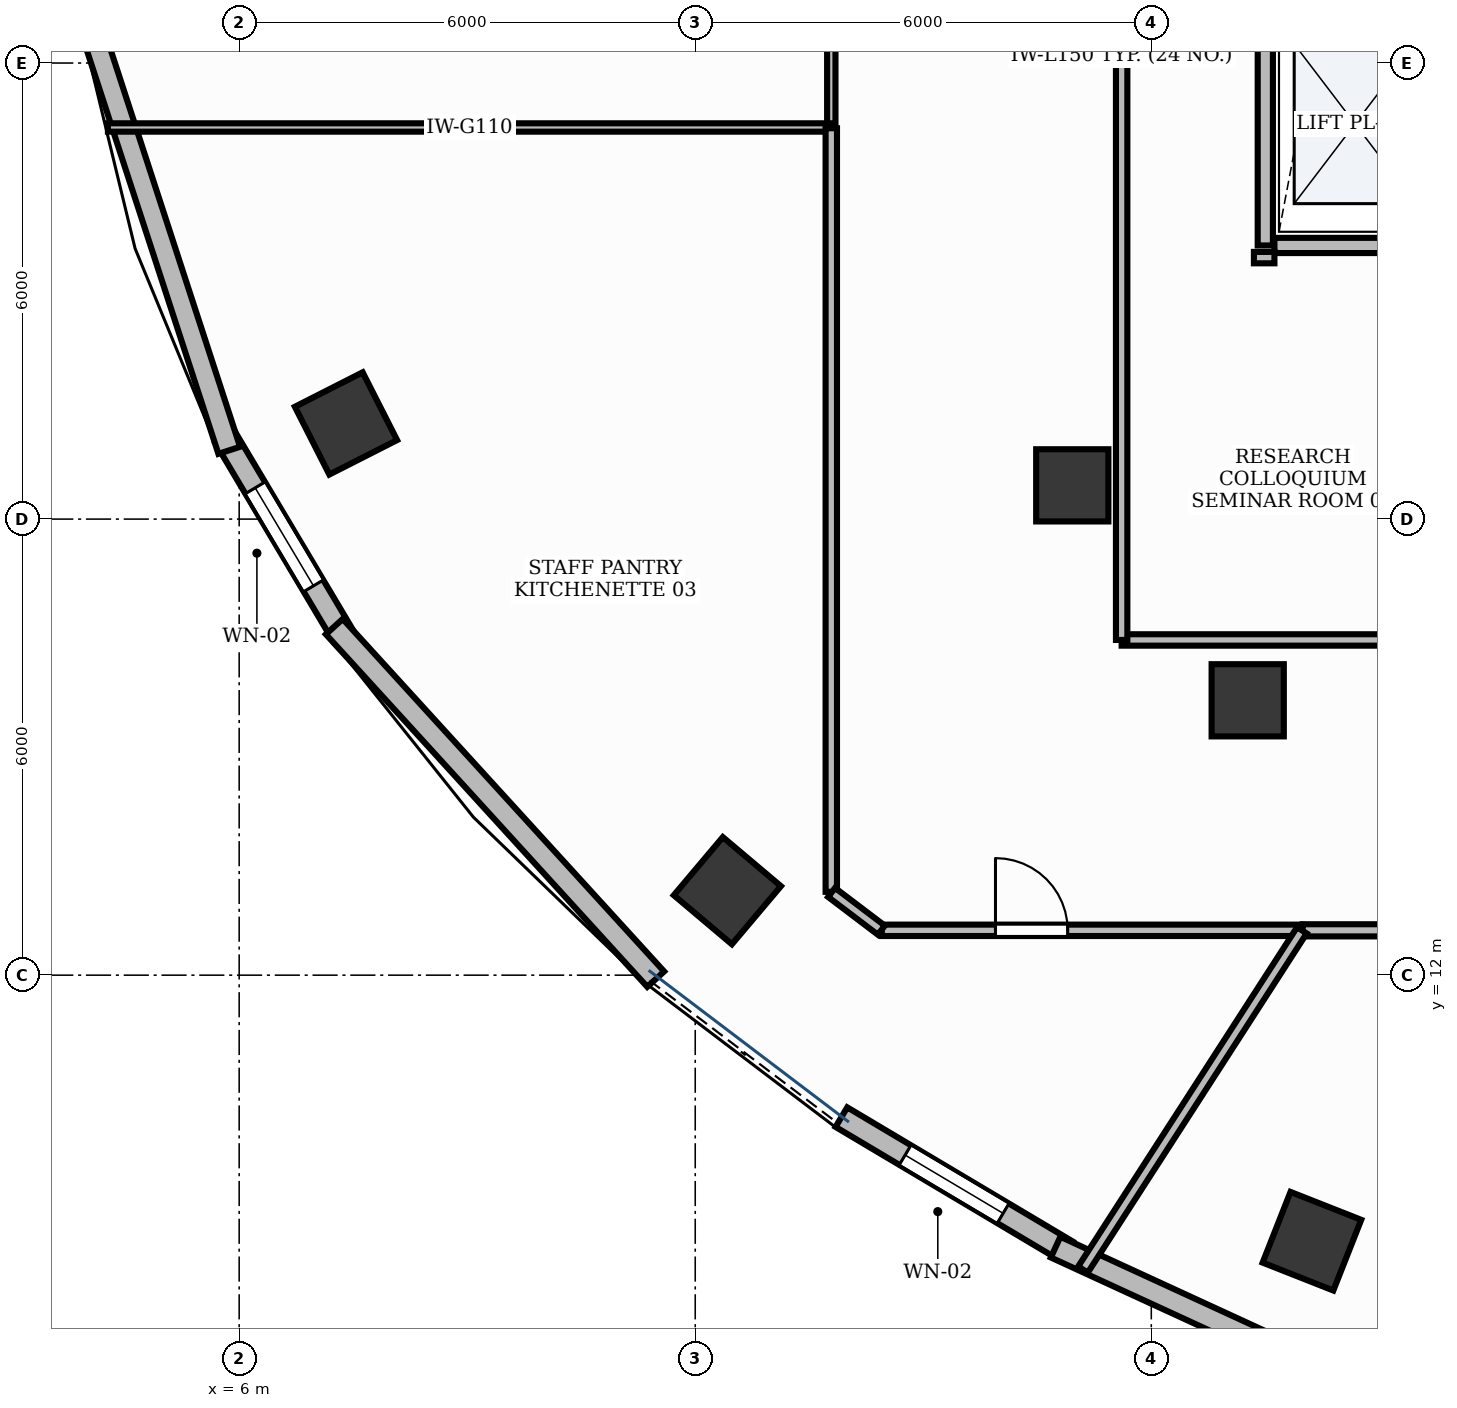
"""IFC4 building model, lengths in metres.
Left out: names, types, materials, properties, quantities, classifications, styles, units other than length and angle.
Written with IfcOpenShell. Run it as: python <this file> out.ifc"""

import sys

from ifc_helpers import new_model, si_unit, direction, frame, frame_2d, origin, origin_2d, place, context, subcontext, project, spatial, rectangle, extrude, element, fill, save


model = new_model("IFC4")
c1 = context("Model", 3, precision=1e-05, world=origin(), true_north=direction((0.0, 1.0)))
c2 = subcontext(c1, "Body", "Model", "MODEL_VIEW")
j1 = project(units=[si_unit("LENGTHUNIT", "METRE"), si_unit("PLANEANGLEUNIT", "RADIAN")], contexts=[c1])
p1 = place(None, origin())
s1 = spatial("IfcSite", under=j1, at=p1, CompositionType="ELEMENT")
p2 = place(p1, origin())
s2 = spatial("IfcBuilding", under=s1, at=p2, CompositionType="ELEMENT")
p3 = place(p2, frame((0.0, 0.0, 218.4)))
s3 = spatial("IfcBuildingStorey", under=s2, at=p3, CompositionType="ELEMENT", Elevation=218.4)
p4 = place(p3, frame((7.405, 19.259, -0.0), z_axis=(0.0, 0.0, 1.0), x_axis=(-0.453057191132, 0.891481453292, 0.0)))
e1 = element("IfcColumn", 1, at=p4, inside=s3, PredefinedType="COLUMN", context=c2, shape_type="SweptSolid", body=[
    extrude(rectangle(XDim=1.0, YDim=1.0, at=origin_2d()), origin(), (0.0, 0.0, 1.0), 3.901),
])
p5 = place(p3, frame((16.96, 18.444, -0.0), z_axis=(0.0, 0.0, 1.0), x_axis=(1.0, 0.0, 0.0)))
e2 = element("IfcColumn", 2, at=p5, inside=s3, PredefinedType="COLUMN", context=c2, shape_type="SweptSolid", body=[
    extrude(rectangle(XDim=0.95, YDim=0.95, at=origin_2d()), origin(), (0.0, 0.0, 1.0), 3.901),
])
p6 = place(p3, frame((12.423, 13.111, -0.0), z_axis=(0.0, 0.0, 1.0), x_axis=(-0.764246456939, 0.644924300253, 0.0)))
e3 = element("IfcColumn", 3, at=p6, inside=s3, PredefinedType="COLUMN", context=c2, shape_type="SweptSolid", body=[
    extrude(rectangle(XDim=1.0, YDim=1.0, at=origin_2d()), origin(), (0.0, 0.0, 1.0), 3.901),
])
p7 = place(p3, frame((19.268, 15.616, -0.0), z_axis=(0.0, 0.0, 1.0), x_axis=(1.0, 0.0, 0.0)))
e4 = element("IfcColumn", 4, at=p7, inside=s3, PredefinedType="COLUMN", context=c2, shape_type="SweptSolid", body=[
    extrude(rectangle(XDim=0.95, YDim=0.95, at=origin_2d()), origin(), (0.0, 0.0, 1.0), 3.901),
])
p8 = place(p3, frame((20.113, 8.5, -0.0), z_axis=(0.0, 0.0, 1.0), x_axis=(-0.930225540858, 0.366988341962, 0.0)))
e5 = element("IfcColumn", 5, at=p8, inside=s3, PredefinedType="COLUMN", context=c2, shape_type="SweptSolid", body=[
    extrude(rectangle(XDim=1.0, YDim=1.0, at=origin_2d()), origin(), (0.0, 0.0, 1.0), 3.901),
])
p9 = place(p3, frame((5.818, 19.071, 0.0), z_axis=(0.0, 0.0, 1.0), x_axis=(0.511263271049, -0.859424148879, 0.0)))
e6 = element("IfcWall", 6, at=p9, inside=s3, PredefinedType="STANDARD", context=c2, shape_type="SweptSolid", body=[
    extrude(rectangle(XDim=3.036, YDim=0.3, at=frame_2d((1.518, 0.0))), origin(), (0.0, 0.0, 1.0), 3.9),
])
p10 = place(p9, frame((0.768, 0.0, 0.95)))
e7 = element("IfcOpeningElement", 7, at=p10, cuts=e6, PredefinedType="OPENING", context=c2, shape_type="SweptSolid", body=[
    extrude(rectangle(XDim=1.5, YDim=1.8, at=frame_2d((0.75, 0.9))), frame((0.0, 0.165, 0.0), z_axis=(0.0, -1.0, 0.0), x_axis=(1.0, 0.0, 0.0)), (0.0, 0.0, 1.0), 0.33),
])
p11 = place(p3, frame((13.923, 10.132, 0.0), z_axis=(0.0, 0.0, 1.0), x_axis=(0.859459434124, -0.511203952543, 0.0)))
e8 = element("IfcWall", 8, at=p11, inside=s3, PredefinedType="STANDARD", context=c2, shape_type="SweptSolid", body=[
    extrude(rectangle(XDim=3.45, YDim=0.3, at=frame_2d((1.725, 0.0))), origin(), (0.0, 0.0, 1.0), 3.9),
])
p12 = place(p11, frame((0.975, 0.0, 0.95)))
e9 = element("IfcOpeningElement", 9, at=p12, cuts=e8, PredefinedType="OPENING", context=c2, shape_type="SweptSolid", body=[
    extrude(rectangle(XDim=1.5, YDim=1.8, at=frame_2d((0.75, 0.9))), frame((0.0, 0.165, 0.0), z_axis=(0.0, -1.0, 0.0), x_axis=(1.0, 0.0, 0.0)), (0.0, 0.0, 1.0), 0.33),
])
p13 = place(p3, frame((4.084, 24.379, 0.0), z_axis=(0.0, 0.0, 1.0), x_axis=(0.309937285623, -0.95075700312, 0.0)))
e10 = element("IfcWall", 10, at=p13, inside=s3, PredefinedType="STANDARD", context=c2, shape_type="SweptSolid", body=[
    extrude(rectangle(XDim=5.758, YDim=0.3, at=frame_2d((2.879, 0.0))), origin(), (0.0, 0.0, 1.0), 3.9),
])
p14 = place(p3, frame((7.252, 16.585, 0.0), z_axis=(0.0, 0.0, 1.0), x_axis=(0.673735114185, -0.73897293314, 0.0)))
e11 = element("IfcWall", 11, at=p14, inside=s3, PredefinedType="STANDARD", context=c2, shape_type="SweptSolid", body=[
    extrude(rectangle(XDim=6.276, YDim=0.3, at=frame_2d((3.138, 0.0))), origin(), (0.0, 0.0, 1.0), 3.9),
])
p15 = place(p3, frame((16.741, 8.422, 0.0), z_axis=(0.0, 0.0, 1.0), x_axis=(0.908506474671, -0.417870776055, 0.0)))
e12 = element("IfcWall", 12, at=p15, inside=s3, PredefinedType="STANDARD", context=c2, shape_type="SweptSolid", body=[
    extrude(rectangle(XDim=3.587, YDim=0.3, at=frame_2d((1.793, 0.0))), origin(), (0.0, 0.0, 1.0), 3.47),
])
p16 = place(p3, frame((19.5, 21.6, 0.0), z_axis=(0.0, 0.0, 1.0), x_axis=(0.0, 1.0, 0.0)))
e13 = element("IfcWall", 13, at=p16, inside=s3, PredefinedType="PARTITIONING", context=c2, shape_type="SweptSolid", body=[
    extrude(rectangle(XDim=10.8, YDim=0.2, at=frame_2d((5.4, 0.0))), origin(), (0.0, 0.0, 1.0), 2.91),
])
p17 = place(p3, frame((19.62, 21.6, 0.0), z_axis=(0.0, 0.0, 1.0), x_axis=(1.0, 0.0, 0.0)))
e14 = element("IfcWall", 14, at=p17, inside=s3, PredefinedType="PARTITIONING", context=c2, shape_type="SweptSolid", body=[
    extrude(rectangle(XDim=2.11, YDim=0.2, at=frame_2d((1.055, 0.0))), origin(), (0.0, 0.0, 1.0), 2.91),
])
p18 = place(p3, frame((13.79, 28.39, 0.0), z_axis=(0.0, 0.0, 1.0), x_axis=(0.0, -1.0, 0.0)))
e15 = element("IfcWall", 15, at=p18, inside=s3, PredefinedType="MOVABLE", context=c2, shape_type="SweptSolid", body=[
    extrude(rectangle(XDim=5.238, YDim=0.11, at=frame_2d((2.619, 0.0))), origin(), (0.0, 0.0, 1.0), 2.91),
])
p19 = place(p18, frame((2.35, 0.0, 0.0)))
e16 = element("IfcOpeningElement", 16, at=p19, cuts=e15, PredefinedType="OPENING", context=c2, shape_type="SweptSolid", body=[
    extrude(rectangle(XDim=0.95, YDim=2.15, at=frame_2d((0.475, 1.075))), frame((0.0, 0.07, 0.0), z_axis=(0.0, -1.0, 0.0), x_axis=(1.0, 0.0, 0.0)), (0.0, 0.0, 1.0), 0.14),
])
p20 = place(p3, frame((14.454, 12.59, 0.0), z_axis=(0.0, 0.0, 1.0), x_axis=(1.0, 0.0, 0.0)))
e17 = element("IfcWall", 17, at=p20, inside=s3, PredefinedType="PARTITIONING", context=c2, shape_type="SweptSolid", body=[
    extrude(rectangle(XDim=5.527, YDim=0.15, at=frame_2d((2.763, 0.0))), origin(), (0.0, 0.0, 1.0), 2.91),
])
p21 = place(p20, frame((1.496, 0.0, 0.0)))
e18 = element("IfcOpeningElement", 18, at=p21, cuts=e17, PredefinedType="OPENING", context=c2, shape_type="SweptSolid", body=[
    extrude(rectangle(XDim=0.95, YDim=2.15, at=frame_2d((0.475, 1.075))), frame((0.0, 0.09, 0.0), z_axis=(0.0, -1.0, 0.0), x_axis=(1.0, 0.0, 0.0)), (0.0, 0.0, 1.0), 0.18),
])
p22 = place(p3, frame((19.991, 12.59, 0.0), z_axis=(0.0, 0.0, 1.0), x_axis=(1.0, 0.0, 0.0)))
e19 = element("IfcWall", 19, at=p22, inside=s3, PredefinedType="PARTITIONING", context=c2, shape_type="SweptSolid", body=[
    extrude(rectangle(XDim=9.611, YDim=0.16, at=frame_2d((4.805, 0.0))), origin(), (0.0, 0.0, 1.0), 2.91),
])
p23 = place(p22, frame((1.591, 0.0, 0.0)))
e20 = element("IfcOpeningElement", 20, at=p23, cuts=e19, PredefinedType="OPENING", context=c2, shape_type="SweptSolid", body=[
    extrude(rectangle(XDim=0.95, YDim=2.15, at=frame_2d((0.475, 1.075))), frame((0.0, 0.095, 0.0), z_axis=(0.0, -1.0, 0.0), x_axis=(1.0, 0.0, 0.0)), (0.0, 0.0, 1.0), 0.19),
])
p24 = place(p3, frame((13.79, 23.152, 0.0), z_axis=(0.0, 0.0, 1.0), x_axis=(-1.0, 0.0, 0.0)))
e21 = element("IfcWall", 21, at=p24, inside=s3, PredefinedType="MOVABLE", context=c2, shape_type="SweptSolid", body=[
    extrude(rectangle(XDim=9.517, YDim=0.11, at=frame_2d((4.758, 0.0))), origin(), (0.0, 0.0, 1.0), 2.91),
])
p25 = place(p3, frame((19.35, 21.44, 0.0), z_axis=(0.0, 0.0, 1.0), x_axis=(1.0, 0.0, 0.0)))
e22 = element("IfcWall", 22, at=p25, inside=s3, PredefinedType="PARTITIONING", context=c2, shape_type="SweptSolid", body=[
    extrude(rectangle(XDim=0.27, YDim=0.15, at=frame_2d((0.135, 0.0))), origin(), (0.0, 0.0, 1.0), 2.91),
])
p26 = place(p3, frame((25.6, 16.41, 0.0), z_axis=(0.0, 0.0, 1.0), x_axis=(-1.0, 0.0, 0.0)))
e23 = element("IfcWall", 23, at=p26, inside=s3, PredefinedType="PARTITIONING", context=c2, shape_type="SweptSolid", body=[
    extrude(rectangle(XDim=7.99, YDim=0.15, at=frame_2d((3.995, 0.0))), origin(), (0.0, 0.0, 1.0), 2.91),
])
p27 = place(p3, frame((17.61, 16.41, 0.0), z_axis=(0.0, 0.0, 1.0), x_axis=(0.0, 1.0, 0.0)))
e24 = element("IfcWall", 24, at=p27, inside=s3, PredefinedType="PARTITIONING", context=c2, shape_type="SweptSolid", body=[
    extrude(rectangle(XDim=15.38, YDim=0.15, at=frame_2d((7.69, 0.0))), origin(), (0.0, 0.0, 1.0), 2.91),
])
p28 = place(p3, frame((13.79, 23.142, 0.0), z_axis=(0.0, 0.0, 1.0), x_axis=(0.0, -1.0, 0.0)))
e25 = element("IfcWall", 25, at=p28, inside=s3, PredefinedType="PARTITIONING", context=c2, shape_type="SweptSolid", body=[
    extrude(rectangle(XDim=10.046, YDim=0.15, at=frame_2d((5.023, 0.0))), origin(), (0.0, 0.0, 1.0), 2.91),
])
p29 = place(p3, frame((13.794, 13.088, 0.0), z_axis=(0.0, 0.0, 1.0), x_axis=(0.796957719098, -0.604035093326, 0.0)))
e26 = element("IfcWall", 26, at=p29, inside=s3, PredefinedType="PARTITIONING", context=c2, shape_type="SweptSolid", body=[
    extrude(rectangle(XDim=0.821, YDim=0.15, at=frame_2d((0.411, 0.0))), origin(), (0.0, 0.0, 1.0), 2.91),
])
p30 = place(p3, frame((19.981, 12.59, 0.0), z_axis=(0.0, 0.0, 1.0), x_axis=(-0.542120587928, -0.840300701026, 0.0)))
e27 = element("IfcWall", 27, at=p30, inside=s3, PredefinedType="PARTITIONING", context=c2, shape_type="SweptSolid", body=[
    extrude(rectangle(XDim=5.311, YDim=0.15, at=frame_2d((2.656, 0.0))), origin(), (0.0, 0.0, 1.0), 2.91),
])
p31 = place(p10, origin())
e28 = element("IfcWindow", 28, at=p31, inside=s3, PartitioningType="DOUBLE_PANEL_VERTICAL", PredefinedType="WINDOW", context=c2, shape_type="SweptSolid", body=[
    extrude(rectangle(XDim=1.5, YDim=1.8, at=frame_2d((0.75, 0.9))), frame((0.0, 0.03, 0.0), z_axis=(0.0, -1.0, 0.0), x_axis=(1.0, 0.0, 0.0)), (0.0, 0.0, 1.0), 0.06),
])
fill(e7, e28)
p32 = place(p12, origin())
e29 = element("IfcWindow", 29, at=p32, inside=s3, PartitioningType="DOUBLE_PANEL_VERTICAL", PredefinedType="WINDOW", context=c2, shape_type="SweptSolid", body=[
    extrude(rectangle(XDim=1.5, YDim=1.8, at=frame_2d((0.75, 0.9))), frame((0.0, 0.03, 0.0), z_axis=(0.0, -1.0, 0.0), x_axis=(1.0, 0.0, 0.0)), (0.0, 0.0, 1.0), 0.06),
])
fill(e9, e29)
p33 = place(p21, origin())
e30 = element("IfcDoor", 30, at=p33, inside=s3, OperationType="SINGLE_SWING_LEFT", PredefinedType="DOOR", context=c2, shape_type="SweptSolid", body=[
    extrude(rectangle(XDim=0.95, YDim=2.15, at=frame_2d((0.475, 1.075))), frame((0.0, 0.025, 0.0), z_axis=(0.0, -1.0, 0.0), x_axis=(1.0, 0.0, 0.0)), (0.0, 0.0, 1.0), 0.05),
])
fill(e18, e30)
save(model, sys.argv[1])
